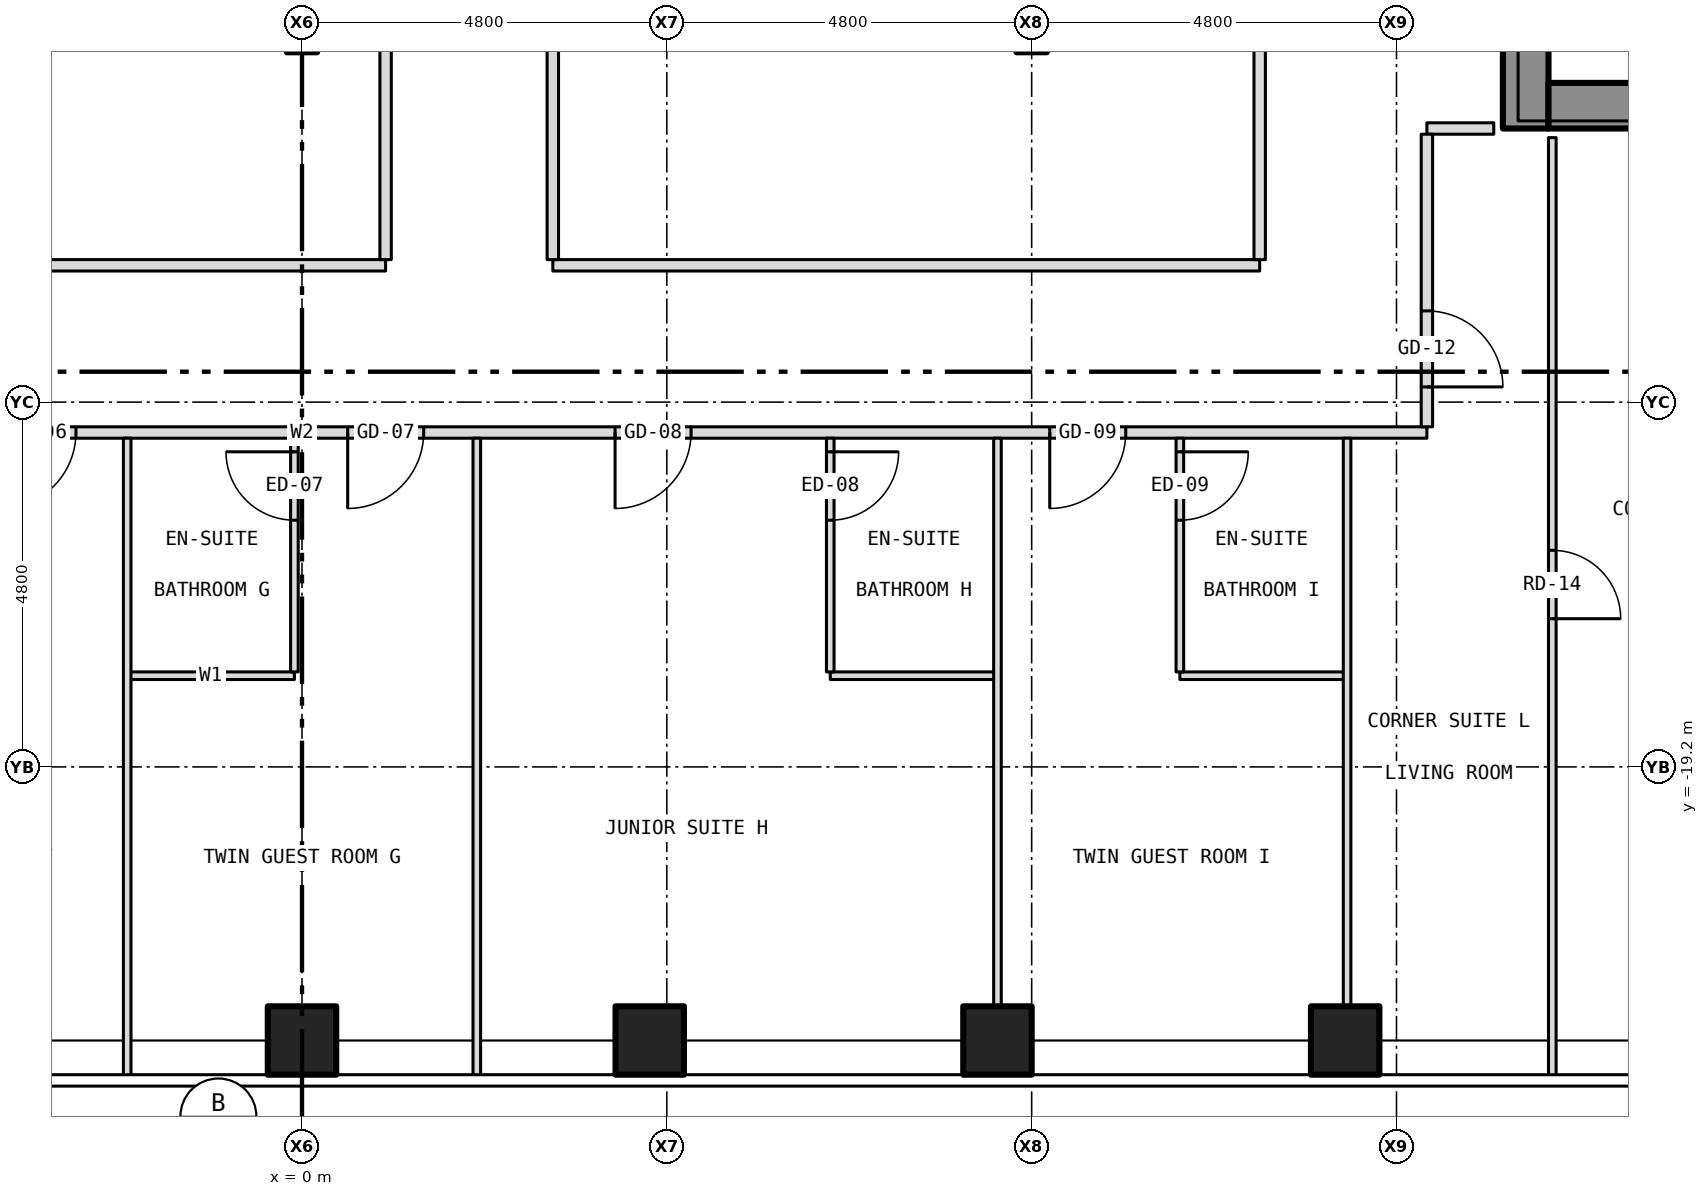
"""IFC4 building model, lengths in metres.
Left out: names, types, materials, properties, quantities, classifications, styles, units other than length and angle.
Written with IfcOpenShell. Run it as: python <this file> out.ifc"""

import sys

from ifc_helpers import new_model, si_unit, direction, frame, frame_2d, origin, origin_2d, place, context, subcontext, project, spatial, rectangle, hollow_rectangle, extrude, element, fill, save


model = new_model("IFC4")
c1 = context("Model", 3, precision=1e-05, world=origin(), true_north=direction((0.0, 1.0)))
c2 = subcontext(c1, "Body", "Model", "MODEL_VIEW")
j1 = project(units=[si_unit("LENGTHUNIT", "METRE"), si_unit("PLANEANGLEUNIT", "RADIAN")], contexts=[c1])
p1 = place(None, origin())
s1 = spatial("IfcSite", under=j1, at=p1, CompositionType="ELEMENT")
p2 = place(p1, origin())
s2 = spatial("IfcBuilding", under=s1, at=p2, CompositionType="ELEMENT")
p3 = place(p2, frame((0.0, 0.0, 96.0)))
s3 = spatial("IfcBuildingStorey", under=s2, at=p3, CompositionType="ELEMENT", Elevation=96.0)
for number, where, z_axis, x_axis in (
    (1, (0.0, -22.8, -0.15), (0.0, 0.0, 1.0), (1.0, 0.0, 0.0)),
    (2, (4.575, -22.8, -0.15), (0.0, 0.0, 1.0), (1.0, 0.0, 0.0)),
    (3, (9.15, -22.8, -0.15), (0.0, 0.0, 1.0), (1.0, 0.0, 0.0)),
    (4, (13.725, -22.8, -0.15), (0.0, 0.0, 1.0), (1.0, 0.0, 0.0)),
):
    element("IfcColumn", number, at=place(p3, frame(where, z_axis=z_axis, x_axis=x_axis)), inside=s3, PredefinedType="COLUMN", context=c2, shape_type="SweptSolid", body=[
        extrude(hollow_rectangle(XDim=0.9, YDim=0.9, WallThickness=0.05, at=origin_2d()), origin(), (0.0, 0.0, 1.0), 3.5),
    ])
p4 = place(p3, frame((16.1, -10.8, 0.0), z_axis=(0.0, 0.0, 1.0), x_axis=(0.0, 1.0, 0.0)))
e5 = element("IfcWall", 5, at=p4, inside=s3, PredefinedType="SHEAR", context=c2, shape_type="SweptSolid", body=[
    extrude(rectangle(XDim=21.6, YDim=0.6, at=frame_2d((10.8, 0.0))), origin(), (0.0, 0.0, 1.0), 3.25),
])
p5 = place(p4, frame((9.4, 0.0, 0.0)))
e6 = element("IfcOpeningElement", 6, at=p5, cuts=e5, PredefinedType="OPENING", context=c2, shape_type="SweptSolid", body=[
    extrude(rectangle(XDim=1.1, YDim=2.1, at=frame_2d((0.55, 1.05))), frame((0.0, 0.312, 0.0), z_axis=(0.0, -1.0, 0.0), x_axis=(1.0, 0.0, 0.0)), (0.0, 0.0, 1.0), 0.624),
])
p6 = place(p4, frame((11.5, 0.0, 0.0)))
e7 = element("IfcOpeningElement", 7, at=p6, cuts=e5, PredefinedType="OPENING", context=c2, shape_type="SweptSolid", body=[
    extrude(rectangle(XDim=1.1, YDim=2.1, at=frame_2d((0.55, 1.05))), frame((0.0, 0.312, 0.0), z_axis=(0.0, -1.0, 0.0), x_axis=(1.0, 0.0, 0.0)), (0.0, 0.0, 1.0), 0.624),
])
p7 = place(p4, frame((13.6, 0.0, 0.0)))
e8 = element("IfcOpeningElement", 8, at=p7, cuts=e5, PredefinedType="OPENING", context=c2, shape_type="SweptSolid", body=[
    extrude(rectangle(XDim=1.1, YDim=2.1, at=frame_2d((0.55, 1.05))), frame((0.0, 0.312, 0.0), z_axis=(0.0, -1.0, 0.0), x_axis=(1.0, 0.0, 0.0)), (0.0, 0.0, 1.0), 0.624),
])
p8 = place(p4, frame((15.7, 0.0, 0.0)))
e9 = element("IfcOpeningElement", 9, at=p8, cuts=e5, PredefinedType="OPENING", context=c2, shape_type="SweptSolid", body=[
    extrude(rectangle(XDim=1.1, YDim=2.1, at=frame_2d((0.55, 1.05))), frame((0.0, 0.312, 0.0), z_axis=(0.0, -1.0, 0.0), x_axis=(1.0, 0.0, 0.0)), (0.0, 0.0, 1.0), 0.624),
])
p9 = place(p4, frame((17.8, 0.0, 0.0)))
e10 = element("IfcOpeningElement", 10, at=p9, cuts=e5, PredefinedType="OPENING", context=c2, shape_type="SweptSolid", body=[
    extrude(rectangle(XDim=1.1, YDim=2.1, at=frame_2d((0.55, 1.05))), frame((0.0, 0.312, 0.0), z_axis=(0.0, -1.0, 0.0), x_axis=(1.0, 0.0, 0.0)), (0.0, 0.0, 1.0), 0.624),
])
p10 = place(p4, frame((5.642, 0.0, 0.0)))
e11 = element("IfcOpeningElement", 11, at=p10, cuts=e5, PredefinedType="OPENING", context=c2, shape_type="SweptSolid", body=[
    extrude(rectangle(XDim=1.1, YDim=2.1, at=frame_2d((0.55, 1.05))), frame((0.0, 0.312, 0.0), z_axis=(0.0, -1.0, 0.0), x_axis=(1.0, 0.0, 0.0)), (0.0, 0.0, 1.0), 0.624),
])
p11 = place(p4, frame((7.5, 0.0, 0.0)))
e12 = element("IfcOpeningElement", 12, at=p11, cuts=e5, PredefinedType="OPENING", context=c2, shape_type="SweptSolid", body=[
    extrude(rectangle(XDim=1.1, YDim=2.1, at=frame_2d((0.55, 1.05))), frame((0.0, 0.312, 0.0), z_axis=(0.0, -1.0, 0.0), x_axis=(1.0, 0.0, 0.0)), (0.0, 0.0, 1.0), 0.624),
])
p12 = place(p3, frame((16.4, -10.5, 0.0), z_axis=(0.0, 0.0, 1.0), x_axis=(1.0, 0.0, 0.0)))
e13 = element("IfcWall", 13, at=p12, inside=s3, PredefinedType="SHEAR", context=c2, shape_type="SweptSolid", body=[
    extrude(rectangle(XDim=5.8, YDim=0.6, at=frame_2d((2.9, 0.0))), origin(), (0.0, 0.0, 1.0), 3.25),
])
for number, where, z_axis, x_axis in (
    (14, (-2.3, -18.0, 0.0), (0.0, 0.0, 1.0), (1.0, 0.0, 0.0)),
    (15, (6.95, -18.0, 0.0), (0.0, 0.0, 1.0), (1.0, 0.0, 0.0)),
    (16, (11.55, -18.0, 0.0), (0.0, 0.0, 1.0), (1.0, 0.0, 0.0)),
):
    element("IfcWall", number, at=place(p3, frame(where, z_axis=z_axis, x_axis=x_axis)), inside=s3, PredefinedType="PARTITIONING", context=c2, shape_type="SweptSolid", body=[
        extrude(rectangle(XDim=2.2, YDim=0.1, at=frame_2d((1.1, 0.0))), origin(), (0.0, 0.0, 1.0), 3.35),
    ])
p13 = place(p3, frame((-14.8, -14.8, 0.0), z_axis=(0.0, 0.0, 1.0), x_axis=(1.0, 0.0, 0.0)))
e17 = element("IfcWall", 17, at=p13, inside=s3, PredefinedType="PARTITIONING", context=c2, shape_type="SweptSolid", body=[
    extrude(rectangle(XDim=29.6, YDim=0.15, at=frame_2d((14.8, 0.0))), origin(), (0.0, 0.0, 1.0), 3.35),
])
p14 = place(p13, frame((2.907, 0.0, 0.0)))
e18 = element("IfcOpeningElement", 18, at=p14, cuts=e17, PredefinedType="OPENING", context=c2, shape_type="SweptSolid", body=[
    extrude(rectangle(XDim=1.0, YDim=2.1, at=frame_2d((0.5, 1.05))), frame((0.0, 0.087, 0.0), z_axis=(0.0, -1.0, 0.0), x_axis=(1.0, 0.0, 0.0)), (0.0, 0.0, 1.0), 0.174),
])
p15 = place(p13, frame((10.826, 0.0, 0.0)))
e19 = element("IfcOpeningElement", 19, at=p15, cuts=e17, PredefinedType="OPENING", context=c2, shape_type="SweptSolid", body=[
    extrude(rectangle(XDim=1.0, YDim=2.1, at=frame_2d((0.5, 1.05))), frame((0.0, 0.087, 0.0), z_axis=(0.0, -1.0, 0.0), x_axis=(1.0, 0.0, 0.0)), (0.0, 0.0, 1.0), 0.174),
])
p16 = place(p13, frame((15.401, 0.0, 0.0)))
e20 = element("IfcOpeningElement", 20, at=p16, cuts=e17, PredefinedType="OPENING", context=c2, shape_type="SweptSolid", body=[
    extrude(rectangle(XDim=1.0, YDim=2.1, at=frame_2d((0.5, 1.05))), frame((0.0, 0.087, 0.0), z_axis=(0.0, -1.0, 0.0), x_axis=(1.0, 0.0, 0.0)), (0.0, 0.0, 1.0), 0.174),
])
p17 = place(p13, frame((18.919, 0.0, 0.0)))
e21 = element("IfcOpeningElement", 21, at=p17, cuts=e17, PredefinedType="OPENING", context=c2, shape_type="SweptSolid", body=[
    extrude(rectangle(XDim=1.0, YDim=2.1, at=frame_2d((0.5, 1.05))), frame((0.0, 0.087, 0.0), z_axis=(0.0, -1.0, 0.0), x_axis=(1.0, 0.0, 0.0)), (0.0, 0.0, 1.0), 0.174),
])
p18 = place(p13, frame((24.638, 0.0, 0.0)))
e22 = element("IfcOpeningElement", 22, at=p18, cuts=e17, PredefinedType="OPENING", context=c2, shape_type="SweptSolid", body=[
    extrude(rectangle(XDim=1.0, YDim=2.1, at=frame_2d((0.5, 1.05))), frame((0.0, 0.087, 0.0), z_axis=(0.0, -1.0, 0.0), x_axis=(1.0, 0.0, 0.0)), (0.0, 0.0, 1.0), 0.174),
])
p19 = place(p3, frame((-12.6, -12.6, 0.0), z_axis=(0.0, 0.0, 1.0), x_axis=(1.0, 0.0, 0.0)))
e23 = element("IfcWall", 23, at=p19, inside=s3, PredefinedType="PARTITIONING", context=c2, shape_type="SweptSolid", body=[
    extrude(rectangle(XDim=13.7, YDim=0.15, at=frame_2d((6.85, 0.0))), origin(), (0.0, 0.0, 1.0), 3.35),
])
p20 = place(p3, frame((3.3, -12.6, 0.0), z_axis=(0.0, 0.0, 1.0), x_axis=(1.0, 0.0, 0.0)))
e24 = element("IfcWall", 24, at=p20, inside=s3, PredefinedType="PARTITIONING", context=c2, shape_type="SweptSolid", body=[
    extrude(rectangle(XDim=9.3, YDim=0.15, at=frame_2d((4.65, 0.0))), origin(), (0.0, 0.0, 1.0), 3.35),
])
p21 = place(p3, frame((14.8, -10.8, 0.0), z_axis=(0.0, 0.0, 1.0), x_axis=(1.0, 0.0, 0.0)))
e25 = element("IfcWall", 25, at=p21, inside=s3, PredefinedType="PARTITIONING", context=c2, shape_type="SweptSolid", body=[
    extrude(rectangle(XDim=0.88, YDim=0.15, at=frame_2d((0.44, 0.0))), origin(), (0.0, 0.0, 1.0), 3.35),
])
p22 = place(p3, frame((-2.3, -23.28, 0.0), z_axis=(0.0, 0.0, 1.0), x_axis=(0.0, 1.0, 0.0)))
e26 = element("IfcWall", 26, at=p22, inside=s3, PredefinedType="PARTITIONING", context=c2, shape_type="SweptSolid", body=[
    extrude(rectangle(XDim=8.405, YDim=0.1, at=frame_2d((4.203, 0.0))), origin(), (0.0, 0.0, 1.0), 3.35),
])
p23 = place(p3, frame((-0.1, -17.95, 0.0), z_axis=(0.0, 0.0, 1.0), x_axis=(0.0, 1.0, 0.0)))
e27 = element("IfcWall", 27, at=p23, inside=s3, PredefinedType="PARTITIONING", context=c2, shape_type="SweptSolid", body=[
    extrude(rectangle(XDim=3.075, YDim=0.1, at=frame_2d((1.538, 0.0))), origin(), (0.0, 0.0, 1.0), 2.728),
])
p24 = place(p23, frame((1.996, 0.0, 0.0)))
e28 = element("IfcOpeningElement", 28, at=p24, cuts=e27, PredefinedType="OPENING", context=c2, shape_type="SweptSolid", body=[
    extrude(rectangle(XDim=0.9, YDim=2.1, at=frame_2d((0.45, 1.05))), frame((0.0, 0.062, 0.0), z_axis=(0.0, -1.0, 0.0), x_axis=(1.0, 0.0, 0.0)), (0.0, 0.0, 1.0), 0.124),
])
p25 = place(p3, frame((1.1, -12.525, 0.0), z_axis=(0.0, 0.0, 1.0), x_axis=(0.0, 1.0, 0.0)))
e29 = element("IfcWall", 29, at=p25, inside=s3, PredefinedType="PARTITIONING", context=c2, shape_type="SweptSolid", body=[
    extrude(rectangle(XDim=18.35, YDim=0.15, at=frame_2d((9.175, 0.0))), origin(), (0.0, 0.0, 1.0), 3.35),
])
p26 = place(p25, frame((8.725, 0.0, 0.0)))
e30 = element("IfcOpeningElement", 30, at=p26, cuts=e29, PredefinedType="OPENING", context=c2, shape_type="SweptSolid", body=[
    extrude(rectangle(XDim=0.9, YDim=2.1, at=frame_2d((0.45, 1.05))), frame((0.0, 0.087, 0.0), z_axis=(0.0, -1.0, 0.0), x_axis=(1.0, 0.0, 0.0)), (0.0, 0.0, 1.0), 0.174),
])
p27 = place(p3, frame((2.3, -23.28, 0.0), z_axis=(0.0, 0.0, 1.0), x_axis=(0.0, 1.0, 0.0)))
e31 = element("IfcWall", 31, at=p27, inside=s3, PredefinedType="PARTITIONING", context=c2, shape_type="SweptSolid", body=[
    extrude(rectangle(XDim=8.405, YDim=0.1, at=frame_2d((4.203, 0.0))), origin(), (0.0, 0.0, 1.0), 3.35),
])
p28 = place(p3, frame((3.3, -12.525, 0.0), z_axis=(0.0, 0.0, 1.0), x_axis=(0.0, 1.0, 0.0)))
e32 = element("IfcWall", 32, at=p28, inside=s3, PredefinedType="PARTITIONING", context=c2, shape_type="SweptSolid", body=[
    extrude(rectangle(XDim=18.35, YDim=0.15, at=frame_2d((9.175, 0.0))), origin(), (0.0, 0.0, 1.0), 3.35),
])
p29 = place(p28, frame((5.775, 0.0, 0.0)))
e33 = element("IfcOpeningElement", 33, at=p29, cuts=e32, PredefinedType="OPENING", context=c2, shape_type="SweptSolid", body=[
    extrude(rectangle(XDim=0.9, YDim=2.1, at=frame_2d((0.45, 1.05))), frame((0.0, 0.087, 0.0), z_axis=(0.0, -1.0, 0.0), x_axis=(1.0, 0.0, 0.0)), (0.0, 0.0, 1.0), 0.174),
])
p30 = place(p3, frame((6.95, -17.95, 0.0), z_axis=(0.0, 0.0, 1.0), x_axis=(0.0, 1.0, 0.0)))
e34 = element("IfcWall", 34, at=p30, inside=s3, PredefinedType="PARTITIONING", context=c2, shape_type="SweptSolid", body=[
    extrude(rectangle(XDim=3.075, YDim=0.1, at=frame_2d((1.538, 0.0))), origin(), (0.0, 0.0, 1.0), 3.35),
])
p31 = place(p30, frame((1.996, 0.0, 0.0)))
e35 = element("IfcOpeningElement", 35, at=p31, cuts=e34, PredefinedType="OPENING", context=c2, shape_type="SweptSolid", body=[
    extrude(rectangle(XDim=0.9, YDim=2.1, at=frame_2d((0.45, 1.05))), frame((0.0, 0.062, 0.0), z_axis=(0.0, -1.0, 0.0), x_axis=(1.0, 0.0, 0.0)), (0.0, 0.0, 1.0), 0.124),
])
p32 = place(p3, frame((9.15, -22.68, 0.0), z_axis=(0.0, 0.0, 1.0), x_axis=(0.0, 1.0, 0.0)))
e36 = element("IfcWall", 36, at=p32, inside=s3, PredefinedType="PARTITIONING", context=c2, shape_type="SweptSolid", body=[
    extrude(rectangle(XDim=7.805, YDim=0.1, at=frame_2d((3.902, 0.0))), origin(), (0.0, 0.0, 1.0), 3.35),
])
p33 = place(p3, frame((11.55, -17.95, 0.0), z_axis=(0.0, 0.0, 1.0), x_axis=(0.0, 1.0, 0.0)))
e37 = element("IfcWall", 37, at=p33, inside=s3, PredefinedType="PARTITIONING", context=c2, shape_type="SweptSolid", body=[
    extrude(rectangle(XDim=3.075, YDim=0.1, at=frame_2d((1.538, 0.0))), origin(), (0.0, 0.0, 1.0), 3.35),
])
p34 = place(p33, frame((1.996, 0.0, 0.0)))
e38 = element("IfcOpeningElement", 38, at=p34, cuts=e37, PredefinedType="OPENING", context=c2, shape_type="SweptSolid", body=[
    extrude(rectangle(XDim=0.9, YDim=2.1, at=frame_2d((0.45, 1.05))), frame((0.0, 0.062, 0.0), z_axis=(0.0, -1.0, 0.0), x_axis=(1.0, 0.0, 0.0)), (0.0, 0.0, 1.0), 0.124),
])
p35 = place(p3, frame((12.6, -12.525, 0.0), z_axis=(0.0, 0.0, 1.0), x_axis=(0.0, 1.0, 0.0)))
e39 = element("IfcWall", 39, at=p35, inside=s3, PredefinedType="PARTITIONING", context=c2, shape_type="SweptSolid", body=[
    extrude(rectangle(XDim=10.525, YDim=0.15, at=frame_2d((5.262, 0.0))), origin(), (0.0, 0.0, 1.0), 3.35),
])
p36 = place(p3, frame((13.75, -22.68, 0.0), z_axis=(0.0, 0.0, 1.0), x_axis=(0.0, 1.0, 0.0)))
e40 = element("IfcWall", 40, at=p36, inside=s3, PredefinedType="PARTITIONING", context=c2, shape_type="SweptSolid", body=[
    extrude(rectangle(XDim=7.805, YDim=0.1, at=frame_2d((3.902, 0.0))), origin(), (0.0, 0.0, 1.0), 3.35),
])
p37 = place(p3, frame((14.8, -14.725, 0.0), z_axis=(0.0, 0.0, 1.0), x_axis=(0.0, 1.0, 0.0)))
e41 = element("IfcWall", 41, at=p37, inside=s3, PredefinedType="PARTITIONING", context=c2, shape_type="SweptSolid", body=[
    extrude(rectangle(XDim=3.85, YDim=0.15, at=frame_2d((1.925, 0.0))), origin(), (0.0, 0.0, 1.0), 3.35),
])
p38 = place(p37, frame((0.525, 0.0, 0.0)))
e42 = element("IfcOpeningElement", 42, at=p38, cuts=e41, PredefinedType="OPENING", context=c2, shape_type="SweptSolid", body=[
    extrude(rectangle(XDim=1.0, YDim=2.1, at=frame_2d((0.5, 1.05))), frame((0.0, 0.087, 0.0), z_axis=(0.0, -1.0, 0.0), x_axis=(1.0, 0.0, 0.0)), (0.0, 0.0, 1.0), 0.174),
])
p39 = place(p3, frame((16.45, -23.28, 0.0), z_axis=(0.0, 0.0, 1.0), x_axis=(0.0, 1.0, 0.0)))
e43 = element("IfcWall", 43, at=p39, inside=s3, PredefinedType="PARTITIONING", context=c2, shape_type="SweptSolid", body=[
    extrude(rectangle(XDim=12.36, YDim=0.1, at=frame_2d((6.18, 0.0))), origin(), (0.0, 0.0, 1.0), 3.35),
])
p40 = place(p39, frame((6.03, 0.0, 0.0)))
e44 = element("IfcOpeningElement", 44, at=p40, cuts=e43, PredefinedType="OPENING", context=c2, shape_type="SweptSolid", body=[
    extrude(rectangle(XDim=0.9, YDim=2.1, at=frame_2d((0.45, 1.05))), frame((0.0, 0.062, 0.0), z_axis=(0.0, -1.0, 0.0), x_axis=(1.0, 0.0, 0.0)), (0.0, 0.0, 1.0), 0.124),
])
p41 = place(p15, origin())
e45 = element("IfcDoor", 45, at=p41, inside=s3, OperationType="SINGLE_SWING_LEFT", PredefinedType="DOOR", context=c2, shape_type="SweptSolid", body=[
    extrude(rectangle(XDim=1.0, YDim=2.1, at=frame_2d((0.5, 1.05))), frame((0.0, 0.025, 0.0), z_axis=(0.0, -1.0, 0.0), x_axis=(1.0, 0.0, 0.0)), (0.0, 0.0, 1.0), 0.05),
])
fill(e19, e45)
p42 = place(p16, origin())
e46 = element("IfcDoor", 46, at=p42, inside=s3, OperationType="SINGLE_SWING_LEFT", PredefinedType="DOOR", context=c2, shape_type="SweptSolid", body=[
    extrude(rectangle(XDim=1.0, YDim=2.1, at=frame_2d((0.5, 1.05))), frame((0.0, 0.025, 0.0), z_axis=(0.0, -1.0, 0.0), x_axis=(1.0, 0.0, 0.0)), (0.0, 0.0, 1.0), 0.05),
])
fill(e20, e46)
p43 = place(p24, origin())
e47 = element("IfcDoor", 47, at=p43, inside=s3, OperationType="SINGLE_SWING_RIGHT", PredefinedType="DOOR", context=c2, shape_type="SweptSolid", body=[
    extrude(rectangle(XDim=0.9, YDim=2.1, at=frame_2d((0.45, 1.05))), frame((0.0, 0.025, 0.0), z_axis=(0.0, -1.0, 0.0), x_axis=(1.0, 0.0, 0.0)), (0.0, 0.0, 1.0), 0.05),
])
fill(e28, e47)
p44 = place(p17, origin())
e48 = element("IfcDoor", 48, at=p44, inside=s3, OperationType="SINGLE_SWING_LEFT", PredefinedType="DOOR", context=c2, shape_type="SweptSolid", body=[
    extrude(rectangle(XDim=1.0, YDim=2.1, at=frame_2d((0.5, 1.05))), frame((0.0, 0.025, 0.0), z_axis=(0.0, -1.0, 0.0), x_axis=(1.0, 0.0, 0.0)), (0.0, 0.0, 1.0), 0.05),
])
fill(e21, e48)
p45 = place(p31, origin())
e49 = element("IfcDoor", 49, at=p45, inside=s3, OperationType="SINGLE_SWING_RIGHT", PredefinedType="DOOR", context=c2, shape_type="SweptSolid", body=[
    extrude(rectangle(XDim=0.9, YDim=2.1, at=frame_2d((0.45, 1.05))), frame((0.0, 0.025, 0.0), z_axis=(0.0, -1.0, 0.0), x_axis=(1.0, 0.0, 0.0)), (0.0, 0.0, 1.0), 0.05),
])
fill(e35, e49)
p46 = place(p18, origin())
e50 = element("IfcDoor", 50, at=p46, inside=s3, OperationType="SINGLE_SWING_LEFT", PredefinedType="DOOR", context=c2, shape_type="SweptSolid", body=[
    extrude(rectangle(XDim=1.0, YDim=2.1, at=frame_2d((0.5, 1.05))), frame((0.0, 0.025, 0.0), z_axis=(0.0, -1.0, 0.0), x_axis=(1.0, 0.0, 0.0)), (0.0, 0.0, 1.0), 0.05),
])
fill(e22, e50)
p47 = place(p34, origin())
e51 = element("IfcDoor", 51, at=p47, inside=s3, OperationType="SINGLE_SWING_RIGHT", PredefinedType="DOOR", context=c2, shape_type="SweptSolid", body=[
    extrude(rectangle(XDim=0.9, YDim=2.1, at=frame_2d((0.45, 1.05))), frame((0.0, 0.025, 0.0), z_axis=(0.0, -1.0, 0.0), x_axis=(1.0, 0.0, 0.0)), (0.0, 0.0, 1.0), 0.05),
])
fill(e38, e51)
p48 = place(p38, origin())
e52 = element("IfcDoor", 52, at=p48, inside=s3, OperationType="SINGLE_SWING_LEFT", PredefinedType="DOOR", context=c2, shape_type="SweptSolid", body=[
    extrude(rectangle(XDim=1.0, YDim=2.1, at=frame_2d((0.5, 1.05))), frame((0.0, 0.025, 0.0), z_axis=(0.0, -1.0, 0.0), x_axis=(1.0, 0.0, 0.0)), (0.0, 0.0, 1.0), 0.05),
])
fill(e42, e52)
p49 = place(p40, origin())
e53 = element("IfcDoor", 53, at=p49, inside=s3, OperationType="SINGLE_SWING_LEFT", PredefinedType="DOOR", context=c2, shape_type="SweptSolid", body=[
    extrude(rectangle(XDim=0.9, YDim=2.1, at=frame_2d((0.45, 1.05))), frame((0.0, 0.025, 0.0), z_axis=(0.0, -1.0, 0.0), x_axis=(1.0, 0.0, 0.0)), (0.0, 0.0, 1.0), 0.05),
])
fill(e44, e53)
save(model, sys.argv[1])
